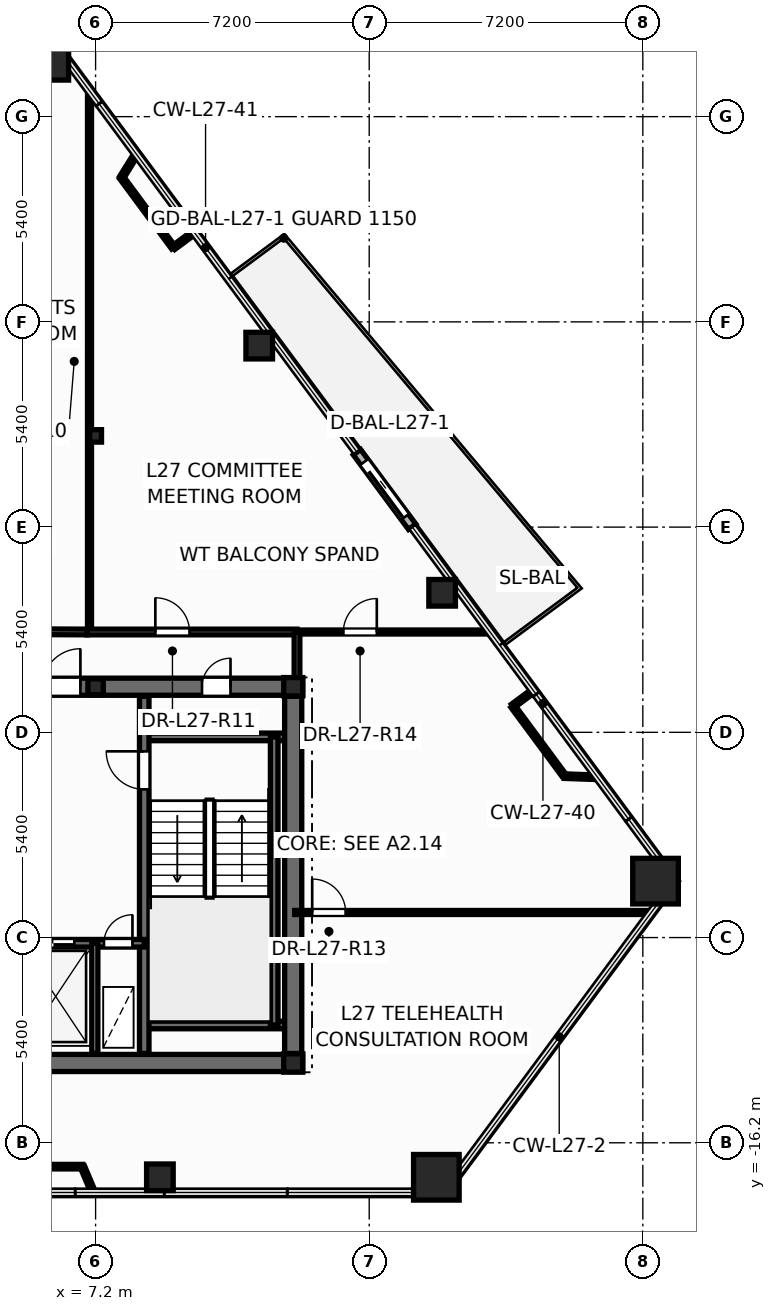
"""IFC4 building model, lengths in metres.
Left out: names, types, materials, properties, quantities, classifications, styles, units other than length and angle.
Written with IfcOpenShell. Run it as: python <this file> out.ifc"""

import sys

from ifc_helpers import new_model, si_unit, direction, frame, frame_2d, origin, origin_2d, place, context, subcontext, project, spatial, rectangle, hollow_rectangle, hollow_circle, i_section, extrude, element, fill, save


model = new_model("IFC4")
c1 = context("Model", 3, precision=1e-05, world=origin(), true_north=direction((0.0, 1.0)))
c2 = subcontext(c1, "Body", "Model", "MODEL_VIEW")
j1 = project(units=[si_unit("LENGTHUNIT", "METRE"), si_unit("PLANEANGLEUNIT", "RADIAN")], contexts=[c1])
p1 = place(None, origin())
s1 = spatial("IfcSite", under=j1, at=p1, CompositionType="ELEMENT")
p2 = place(p1, origin())
s2 = spatial("IfcBuilding", under=s1, at=p2, CompositionType="ELEMENT")
p3 = place(p2, frame((0.0, 0.0, 106.8)))
s3 = spatial("IfcBuildingStorey", under=s2, at=p3, CompositionType="ELEMENT", Elevation=106.8)
for number, where, z_axis, x_axis in (
    (1, (16.167, -17.108, 0.0), (0.0, 0.0, 1.0), (1.0, 0.0, 0.0)),
    (2, (21.934, -9.316, 0.0), (0.0, 0.0, 1.0), (1.0, 0.0, 0.0)),
    (3, (5.89, 12.362, 0.0), (0.0, 0.0, 1.0), (1.0, 0.0, 0.0)),
):
    element("IfcColumn", number, at=place(p3, frame(where, z_axis=z_axis, x_axis=x_axis)), inside=s3, PredefinedType="COLUMN", context=c2, shape_type="SweptSolid", body=[
        extrude(hollow_rectangle(XDim=1.2, YDim=1.2, WallThickness=0.055, at=origin_2d()), origin(), (0.0, 0.0, 1.0), 3.6),
    ])
for number, where, z_axis, x_axis in (
    (4, (8.892, -17.108, 0.0), (0.0, 0.0, 1.0), (1.0, 0.0, 0.0)),
    (5, (16.319, -1.729, 0.0), (0.0, 0.0, 1.0), (1.0, 0.0, 0.0)),
    (6, (11.506, 4.775, 0.0), (0.0, 0.0, 1.0), (1.0, 0.0, 0.0)),
):
    element("IfcColumn", number, at=place(p3, frame(where, z_axis=z_axis, x_axis=x_axis)), inside=s3, PredefinedType="COLUMN", context=c2, shape_type="SweptSolid", body=[
        extrude(hollow_circle(Radius=0.35, WallThickness=0.03, at=origin_2d()), origin(), (0.0, 0.0, 1.0), 3.6),
    ])
for number, where, z_axis, x_axis in (
    (7, (12.4, -14.1, 0.0), (0.0, 0.0, 1.0), (1.0, 0.0, 0.0)),
    (8, (12.4, -4.2, 0.0), (0.0, 0.0, 1.0), (1.0, 0.0, 0.0)),
):
    element("IfcColumn", number, at=place(p3, frame(where, z_axis=z_axis, x_axis=x_axis)), inside=s3, PredefinedType="COLUMN", context=c2, shape_type="SweptSolid", body=[
        extrude(i_section(OverallWidth=0.5, OverallDepth=0.482, WebThickness=0.04, FlangeThickness=0.045, at=origin_2d()), origin(), (0.0, 0.0, 1.0), 3.6),
    ])
p4 = place(p3, frame((7.2, -4.2, 0.0), z_axis=(0.0, 0.0, 1.0), x_axis=(1.0, 0.0, 0.0)))
e9 = element("IfcColumn", 9, at=p4, inside=s3, PredefinedType="PILASTER", context=c2, shape_type="SweptSolid", body=[
    extrude(i_section(OverallWidth=0.405, OverallDepth=0.414, WebThickness=0.022, FlangeThickness=0.032, at=origin_2d()), origin(), (0.0, 0.0, 1.0), 3.6),
])
p5 = place(p3, frame((7.2, 2.4, 0.0), z_axis=(0.0, 0.0, 1.0), x_axis=(1.0, 0.0, 0.0)))
e10 = element("IfcColumn", 10, at=p5, inside=s3, PredefinedType="COLUMN", context=c2, shape_type="SweptSolid", body=[
    extrude(i_section(OverallWidth=0.311, OverallDepth=0.327, WebThickness=0.016, FlangeThickness=0.025, at=origin_2d()), origin(), (0.0, 0.0, 1.0), 3.6),
])
p6 = place(p3, frame((15.53, 0.01, -0.015), z_axis=(0.0, 0.0, 1.0), x_axis=(-0.594897308784, 0.803801711868, 0.0)))
e11 = element("IfcWall", 11, at=p6, inside=s3, PredefinedType="STANDARD", context=c2, shape_type="SweptSolid", body=[
    extrude(rectangle(XDim=2.44, YDim=0.24, at=frame_2d((1.22, 0.0))), origin(), (0.0, 0.0, 1.0), 2.729),
])
p7 = place(p6, frame((0.32, 0.0, 0.015)))
e12 = element("IfcOpeningElement", 12, at=p7, cuts=e11, PredefinedType="OPENING", context=c2, shape_type="SweptSolid", body=[
    extrude(rectangle(XDim=1.806, YDim=2.204, at=frame_2d((0.9, 1.102))), frame((0.0, 0.13, 0.0), z_axis=(0.0, -1.0, 0.0), x_axis=(1.0, 0.0, 0.0)), (0.0, 0.0, 1.0), 0.26),
])
p8 = place(p3, frame((-12.65, -14.1, 0.0), z_axis=(0.0, 0.0, 1.0), x_axis=(1.0, 0.0, 0.0)))
e13 = element("IfcWall", 13, at=p8, inside=s3, PredefinedType="SHEAR", context=c2, shape_type="SweptSolid", body=[
    extrude(rectangle(XDim=25.3, YDim=0.45, at=frame_2d((12.65, 0.0))), origin(), (0.0, 0.0, 1.0), 3.6),
])
p9 = place(p3, frame((-12.65, -4.2, 0.0), z_axis=(0.0, 0.0, 1.0), x_axis=(1.0, 0.0, 0.0)))
e14 = element("IfcWall", 14, at=p9, inside=s3, PredefinedType="SHEAR", context=c2, shape_type="SweptSolid", body=[
    extrude(rectangle(XDim=25.3, YDim=0.45, at=frame_2d((12.65, 0.0))), origin(), (0.0, 0.0, 1.0), 3.6),
])
p10 = place(p9, frame((1.85, 0.0, 0.0)))
e15 = element("IfcOpeningElement", 15, at=p10, cuts=e14, PredefinedType="OPENING", context=c2, shape_type="SweptSolid", body=[
    extrude(rectangle(XDim=0.756, YDim=2.054, at=frame_2d((0.375, 1.027))), frame((0.0, 0.235, 0.0), z_axis=(0.0, -1.0, 0.0), x_axis=(1.0, 0.0, 0.0)), (0.0, 0.0, 1.0), 0.47),
])
p11 = place(p9, frame((22.65, 0.0, 0.0)))
e16 = element("IfcOpeningElement", 16, at=p11, cuts=e14, PredefinedType="OPENING", context=c2, shape_type="SweptSolid", body=[
    extrude(rectangle(XDim=0.756, YDim=2.054, at=frame_2d((0.375, 1.027))), frame((0.0, 0.235, 0.0), z_axis=(0.0, -1.0, 0.0), x_axis=(1.0, 0.0, 0.0)), (0.0, 0.0, 1.0), 0.47),
])
p12 = place(p9, frame((5.85, 0.0, 0.0)))
e17 = element("IfcOpeningElement", 17, at=p12, cuts=e14, PredefinedType="OPENING", context=c2, shape_type="SweptSolid", body=[
    extrude(rectangle(XDim=1.006, YDim=2.104, at=frame_2d((0.5, 1.052))), frame((0.0, 0.235, 0.0), z_axis=(0.0, -1.0, 0.0), x_axis=(1.0, 0.0, 0.0)), (0.0, 0.0, 1.0), 0.47),
])
p13 = place(p9, frame((10.35, 0.0, 0.0)))
e18 = element("IfcOpeningElement", 18, at=p13, cuts=e14, PredefinedType="OPENING", context=c2, shape_type="SweptSolid", body=[
    extrude(rectangle(XDim=1.406, YDim=2.154, at=frame_2d((0.7, 1.077))), frame((0.0, 0.235, 0.0), z_axis=(0.0, -1.0, 0.0), x_axis=(1.0, 0.0, 0.0)), (0.0, 0.0, 1.0), 0.47),
])
p14 = place(p9, frame((18.45, 0.0, 0.0)))
e19 = element("IfcOpeningElement", 19, at=p14, cuts=e14, PredefinedType="OPENING", context=c2, shape_type="SweptSolid", body=[
    extrude(rectangle(XDim=1.006, YDim=2.104, at=frame_2d((0.5, 1.052))), frame((0.0, 0.235, 0.0), z_axis=(0.0, -1.0, 0.0), x_axis=(1.0, 0.0, 0.0)), (0.0, 0.0, 1.0), 0.47),
])
for number, where, z_axis, x_axis in (
    (20, (8.48, -5.52, 0.0), (0.0, 0.0, 1.0), (1.0, 0.0, 0.0)),
    (21, (8.48, -13.1, 0.0), (0.0, 0.0, 1.0), (1.0, 0.0, 0.0)),
):
    element("IfcWall", number, at=place(p3, frame(where, z_axis=z_axis, x_axis=x_axis)), inside=s3, PredefinedType="SOLIDWALL", context=c2, shape_type="SweptSolid", body=[
        extrude(rectangle(XDim=3.87, YDim=0.2, at=frame_2d((1.935, 0.0))), origin(), (0.0, 0.0, 1.0), 3.6),
    ])
p15 = place(p3, frame((11.9, -13.1, 0.0), z_axis=(0.0, 0.0, 1.0), x_axis=(0.0, 1.0, 0.0)))
e22 = element("IfcWall", 22, at=p15, inside=s3, PredefinedType="SOLIDWALL", context=c2, shape_type="SweptSolid", body=[
    extrude(rectangle(XDim=7.58, YDim=0.2, at=frame_2d((3.79, 0.0))), origin(), (0.0, 0.0, 1.0), 3.6),
])
p16 = place(p3, frame((8.48, -13.85, 0.0), z_axis=(0.0, 0.0, 1.0), x_axis=(0.0, 1.0, 0.0)))
e23 = element("IfcWall", 23, at=p16, inside=s3, PredefinedType="SHEAR", context=c2, shape_type="SweptSolid", body=[
    extrude(rectangle(XDim=9.4, YDim=0.25, at=frame_2d((4.7, 0.0))), origin(), (0.0, 0.0, 1.0), 3.6),
])
p17 = place(p16, frame((6.95, 0.0, 0.0)))
e24 = element("IfcOpeningElement", 24, at=p17, cuts=e23, PredefinedType="OPENING", context=c2, shape_type="SweptSolid", body=[
    extrude(rectangle(XDim=1.006, YDim=2.104, at=frame_2d((0.5, 1.052))), frame((0.0, 0.135, 0.0), z_axis=(0.0, -1.0, 0.0), x_axis=(1.0, 0.0, 0.0)), (0.0, 0.0, 1.0), 0.27),
])
p18 = place(p3, frame((5.12, -10.95, 0.0), z_axis=(0.0, 0.0, 1.0), x_axis=(1.0, 0.0, 0.0)))
e25 = element("IfcWall", 25, at=p18, inside=s3, PredefinedType="SOLIDWALL", context=c2, shape_type="SweptSolid", body=[
    extrude(rectangle(XDim=3.36, YDim=0.2, at=frame_2d((1.68, 0.0))), origin(), (0.0, 0.0, 1.0), 3.6),
])
p19 = place(p18, frame((0.42, 0.0, 0.0)))
e26 = element("IfcOpeningElement", 26, at=p19, cuts=e25, PredefinedType="OPENING", context=c2, shape_type="SweptSolid", body=[
    extrude(rectangle(XDim=1.106, YDim=2.104, at=frame_2d((0.55, 1.052))), frame((0.0, 0.11, 0.0), z_axis=(0.0, -1.0, 0.0), x_axis=(1.0, 0.0, 0.0)), (0.0, 0.0, 1.0), 0.22),
])
p20 = place(p18, frame((2.3, 0.0, 0.0)))
e27 = element("IfcOpeningElement", 27, at=p20, cuts=e25, PredefinedType="OPENING", context=c2, shape_type="SweptSolid", body=[
    extrude(rectangle(XDim=0.756, YDim=2.054, at=frame_2d((0.375, 1.027))), frame((0.0, 0.11, 0.0), z_axis=(0.0, -1.0, 0.0), x_axis=(1.0, 0.0, 0.0)), (0.0, 0.0, 1.0), 0.22),
])
p21 = place(p3, frame((7.18, -13.85, 0.0), z_axis=(0.0, 0.0, 1.0), x_axis=(0.0, 1.0, 0.0)))
e28 = element("IfcWall", 28, at=p21, inside=s3, PredefinedType="PARTITIONING", context=c2, shape_type="SweptSolid", body=[
    extrude(rectangle(XDim=2.9, YDim=0.16, at=frame_2d((1.45, 0.0))), origin(), (0.0, 0.0, 1.0), 2.375),
])
p22 = place(p3, frame((12.4, -13.85, 0.0), z_axis=(0.0, 0.0, 1.0), x_axis=(0.0, 1.0, 0.0)))
e29 = element("IfcWall", 29, at=p22, inside=s3, PredefinedType="SHEAR", context=c2, shape_type="SweptSolid", body=[
    extrude(rectangle(XDim=9.4, YDim=0.45, at=frame_2d((4.7, 0.0))), origin(), (0.0, 0.0, 1.0), 3.6),
])
p23 = place(p3, frame((7.04, -2.76, 0.0), z_axis=(0.0, 0.0, 1.0), x_axis=(0.0, 1.0, 0.0)))
e30 = element("IfcWall", 30, at=p23, inside=s3, PredefinedType="PARTITIONING", context=c2, shape_type="SweptSolid", body=[
    extrude(rectangle(XDim=14.241, YDim=0.105, at=frame_2d((7.12, 0.0))), origin(), (0.0, 0.0, 1.0), 2.325),
])
p24 = place(p3, frame((12.44, -10.14, 0.0), z_axis=(0.0, 0.0, 1.0), x_axis=(1.0, 0.0, 0.0)))
e31 = element("IfcWall", 31, at=p24, inside=s3, PredefinedType="PARTITIONING", context=c2, shape_type="SweptSolid", body=[
    extrude(rectangle(XDim=9.382, YDim=0.105, at=frame_2d((4.691, 0.0))), origin(), (0.0, 0.0, 1.0), 2.713),
])
p25 = place(p24, frame((0.46, 0.0, 0.0)))
e32 = element("IfcOpeningElement", 32, at=p25, cuts=e31, PredefinedType="OPENING", context=c2, shape_type="SweptSolid", body=[
    extrude(rectangle(XDim=0.886, YDim=2.104, at=frame_2d((0.44, 1.052))), frame((0.0, 0.062, 0.0), z_axis=(0.0, -1.0, 0.0), x_axis=(1.0, 0.0, 0.0)), (0.0, 0.0, 1.0), 0.125),
])
p26 = place(p3, frame((6.98, -2.76, 0.0), z_axis=(0.0, 0.0, 1.0), x_axis=(1.0, 0.0, 0.0)))
e33 = element("IfcWall", 33, at=p26, inside=s3, PredefinedType="PARTITIONING", context=c2, shape_type="SweptSolid", body=[
    extrude(rectangle(XDim=5.52, YDim=0.15, at=frame_2d((2.76, 0.0))), origin(), (0.0, 0.0, 1.0), 2.325),
])
p27 = place(p26, frame((1.792, 0.0, 0.0)))
e34 = element("IfcOpeningElement", 34, at=p27, cuts=e33, PredefinedType="OPENING", context=c2, shape_type="SweptSolid", body=[
    extrude(rectangle(XDim=0.906, YDim=2.104, at=frame_2d((0.45, 1.052))), frame((0.0, 0.085, 0.0), z_axis=(0.0, -1.0, 0.0), x_axis=(1.0, 0.0, 0.0)), (0.0, 0.0, 1.0), 0.17),
])
p28 = place(p3, frame((12.44, -2.76, 0.0), z_axis=(0.0, 0.0, 1.0), x_axis=(1.0, 0.0, 0.0)))
e35 = element("IfcWall", 35, at=p28, inside=s3, PredefinedType="PARTITIONING", context=c2, shape_type="SweptSolid", body=[
    extrude(rectangle(XDim=5.14, YDim=0.105, at=frame_2d((2.57, 0.0))), origin(), (0.0, 0.0, 1.0), 2.713),
])
p29 = place(p28, frame((1.28, 0.0, 0.0)))
e36 = element("IfcOpeningElement", 36, at=p29, cuts=e35, PredefinedType="OPENING", context=c2, shape_type="SweptSolid", body=[
    extrude(rectangle(XDim=0.886, YDim=2.104, at=frame_2d((0.44, 1.052))), frame((0.0, 0.062, 0.0), z_axis=(0.0, -1.0, 0.0), x_axis=(1.0, 0.0, 0.0)), (0.0, 0.0, 1.0), 0.125),
])
p30 = place(p3, frame((2.36, -2.74, 0.0), z_axis=(0.0, 0.0, 1.0), x_axis=(0.999991056007, -0.0042294097, 0.0)))
e37 = element("IfcWall", 37, at=p30, inside=s3, PredefinedType="PARTITIONING", context=c2, shape_type="SweptSolid", body=[
    extrude(rectangle(XDim=4.618, YDim=0.15, at=frame_2d((2.309, 0.0))), origin(), (0.0, 0.0, 1.0), 2.918),
])
p31 = place(p3, frame((2.793, -16.828, 0.0), z_axis=(0.0, 0.0, 1.0), x_axis=(1.0, 0.0, 0.0)))
e38 = element("IfcWall", 38, at=p31, inside=s3, PredefinedType="PARTITIONING", context=c2, shape_type="SweptSolid", body=[
    extrude(rectangle(XDim=4.059, YDim=0.12, at=frame_2d((2.03, 0.0))), origin(), (0.0, 0.0, 1.0), 3.35),
])
for number, where, z_axis, x_axis in (
    (39, (19.541, -6.552, 0.0), (0.0, 0.0, 1.0), (-0.595, 0.804, 0.0)),
    (40, (9.249, 7.353, 0.0), (0.0, 0.0, 1.0), (-0.595, 0.804, 0.0)),
):
    element("IfcWall", number, at=place(p3, frame(where, z_axis=z_axis, x_axis=x_axis)), inside=s3, PredefinedType="PARTITIONING", context=c2, shape_type="SweptSolid", body=[
        extrude(rectangle(XDim=2.294, YDim=0.12, at=frame_2d((1.147, 0.0))), origin(), (0.0, 0.0, 1.0), 3.35),
    ])
p32 = place(p3, frame((12.5, -4.24, 0.0), z_axis=(0.0, 0.0, 1.0), x_axis=(0.0, 1.0, 0.0)))
e41 = element("IfcWall", 41, at=p32, inside=s3, PredefinedType="PARTITIONING", context=c2, shape_type="SweptSolid", body=[
    extrude(rectangle(XDim=1.48, YDim=0.15, at=frame_2d((0.74, 0.0))), origin(), (0.0, 0.0, 1.0), 2.325),
])
p33 = place(p3, frame((20.397, -6.583, 0.0), z_axis=(0.0, 0.0, 1.0), x_axis=(-0.999345316153, 0.036179263156, 0.0)))
e42 = element("IfcWall", 42, at=p33, inside=s3, PredefinedType="PARTITIONING", context=c2, shape_type="SweptSolid", body=[
    extrude(rectangle(XDim=0.857, YDim=0.12, at=frame_2d((0.428, 0.0))), origin(), (0.0, 0.0, 1.0), 2.713),
])
p34 = place(p3, frame((6.852, -16.828, 0.0), z_axis=(0.0, 0.0, 1.0), x_axis=(0.389377166864, -0.921078401617, 0.0)))
e43 = element("IfcWall", 43, at=p34, inside=s3, PredefinedType="PARTITIONING", context=c2, shape_type="SweptSolid", body=[
    extrude(rectangle(XDim=0.727, YDim=0.12, at=frame_2d((0.364, 0.0))), origin(), (0.0, 0.0, 1.0), 2.713),
])
p35 = place(p3, frame((7.884, 9.198, 0.0), z_axis=(0.0, 0.0, 1.0), x_axis=(0.528079385195, 0.849195008777, 0.0)))
e44 = element("IfcWall", 44, at=p35, inside=s3, PredefinedType="PARTITIONING", context=c2, shape_type="SweptSolid", body=[
    extrude(rectangle(XDim=0.721, YDim=0.12, at=frame_2d((0.36, 0.0))), origin(), (0.0, 0.0, 1.0), 2.713),
])
for number, where, z_axis, x_axis in (
    (45, (18.176, -4.708, 0.0), (0.0, 0.0, 1.0), (0.804, 0.595, 0.0)),
    (46, (9.787, 7.752, 0.0), (0.0, 0.0, 1.0), (-0.804, -0.595, 0.0)),
):
    element("IfcWall", number, at=place(p3, frame(where, z_axis=z_axis, x_axis=x_axis)), inside=s3, PredefinedType="PARTITIONING", context=c2, shape_type="SweptSolid", body=[
        extrude(rectangle(XDim=0.67, YDim=0.12, at=frame_2d((0.335, 0.0))), origin(), (0.0, 0.0, 1.0), 2.713),
    ])
p36 = place(p7, origin())
e47 = element("IfcDoor", 47, at=p36, inside=s3, OperationType="SLIDING_TO_LEFT", PredefinedType="DOOR", context=c2, shape_type="SweptSolid", body=[
    extrude(rectangle(XDim=1.8, YDim=2.2, at=frame_2d((0.9, 1.1))), frame((0.0, 0.025, 0.0), z_axis=(0.0, -1.0, 0.0), x_axis=(1.0, 0.0, 0.0)), (0.0, 0.0, 1.0), 0.05),
])
fill(e12, e47)
p37 = place(p17, origin())
e48 = element("IfcDoor", 48, at=p37, inside=s3, OperationType="SINGLE_SWING_RIGHT", PredefinedType="DOOR", context=c2, shape_type="SweptSolid", body=[
    extrude(rectangle(XDim=1.0, YDim=2.1, at=frame_2d((0.5, 1.05))), frame((0.0, 0.025, 0.0), z_axis=(0.0, -1.0, 0.0), x_axis=(1.0, 0.0, 0.0)), (0.0, 0.0, 1.0), 0.05),
])
fill(e24, e48)
p38 = place(p19, origin())
e49 = element("IfcDoor", 49, at=p38, inside=s3, OperationType="DOUBLE_DOOR_SLIDING", PredefinedType="DOOR", context=c2, shape_type="SweptSolid", body=[
    extrude(rectangle(XDim=1.1, YDim=2.1, at=frame_2d((0.55, 1.05))), frame((0.0, 0.025, 0.0), z_axis=(0.0, -1.0, 0.0), x_axis=(1.0, 0.0, 0.0)), (0.0, 0.0, 1.0), 0.05),
])
fill(e26, e49)
p39 = place(p20, origin())
e50 = element("IfcDoor", 50, at=p39, inside=s3, OperationType="SINGLE_SWING_RIGHT", PredefinedType="DOOR", context=c2, shape_type="SweptSolid", body=[
    extrude(rectangle(XDim=0.75, YDim=2.05, at=frame_2d((0.375, 1.025))), frame((0.0, 0.025, 0.0), z_axis=(0.0, -1.0, 0.0), x_axis=(1.0, 0.0, 0.0)), (0.0, 0.0, 1.0), 0.05),
])
fill(e27, e50)
p40 = place(p11, origin())
e51 = element("IfcDoor", 51, at=p40, inside=s3, OperationType="SINGLE_SWING_RIGHT", PredefinedType="DOOR", context=c2, shape_type="SweptSolid", body=[
    extrude(rectangle(XDim=0.75, YDim=2.05, at=frame_2d((0.375, 1.025))), frame((0.0, 0.025, 0.0), z_axis=(0.0, -1.0, 0.0), x_axis=(1.0, 0.0, 0.0)), (0.0, 0.0, 1.0), 0.05),
])
fill(e16, e51)
p41 = place(p14, origin())
e52 = element("IfcDoor", 52, at=p41, inside=s3, OperationType="SINGLE_SWING_RIGHT", PredefinedType="DOOR", context=c2, shape_type="SweptSolid", body=[
    extrude(rectangle(XDim=1.0, YDim=2.1, at=frame_2d((0.5, 1.05))), frame((0.0, 0.025, 0.0), z_axis=(0.0, -1.0, 0.0), x_axis=(1.0, 0.0, 0.0)), (0.0, 0.0, 1.0), 0.05),
])
fill(e19, e52)
p42 = place(p27, origin())
e53 = element("IfcDoor", 53, at=p42, inside=s3, OperationType="SINGLE_SWING_LEFT", PredefinedType="DOOR", context=c2, shape_type="SweptSolid", body=[
    extrude(rectangle(XDim=0.9, YDim=2.1, at=frame_2d((0.45, 1.05))), frame((0.0, 0.025, 0.0), z_axis=(0.0, -1.0, 0.0), x_axis=(1.0, 0.0, 0.0)), (0.0, 0.0, 1.0), 0.05),
])
fill(e34, e53)
p43 = place(p25, origin())
e54 = element("IfcDoor", 54, at=p43, inside=s3, OperationType="SINGLE_SWING_LEFT", PredefinedType="DOOR", context=c2, shape_type="SweptSolid", body=[
    extrude(rectangle(XDim=0.88, YDim=2.1, at=frame_2d((0.44, 1.05))), frame((0.0, 0.025, 0.0), z_axis=(0.0, -1.0, 0.0), x_axis=(1.0, 0.0, 0.0)), (0.0, 0.0, 1.0), 0.05),
])
fill(e32, e54)
p44 = place(p29, origin())
e55 = element("IfcDoor", 55, at=p44, inside=s3, OperationType="SINGLE_SWING_RIGHT", PredefinedType="DOOR", context=c2, shape_type="SweptSolid", body=[
    extrude(rectangle(XDim=0.88, YDim=2.1, at=frame_2d((0.44, 1.05))), frame((0.0, 0.025, 0.0), z_axis=(0.0, -1.0, 0.0), x_axis=(1.0, 0.0, 0.0)), (0.0, 0.0, 1.0), 0.05),
])
fill(e36, e55)
save(model, sys.argv[1])
